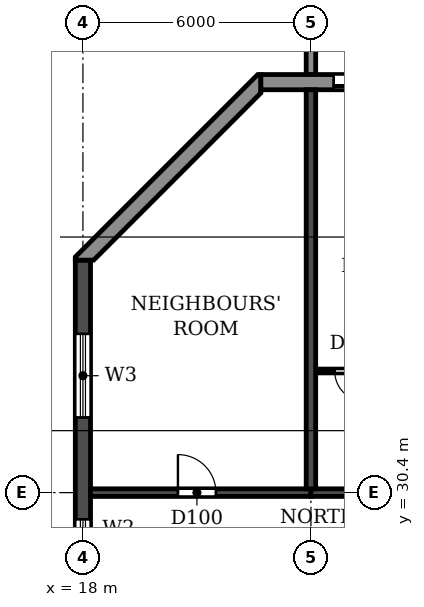
"""IFC4 building model, lengths in metres.
Left out: names, types, materials, properties, quantities, classifications, styles, units other than length and angle.
Written with IfcOpenShell. Run it as: python <this file> out.ifc"""

import sys

from ifc_helpers import new_model, si_unit, direction, frame, frame_2d, origin, place, context, subcontext, project, spatial, polyline, rectangle, outline, extrude, source, transform, mapped, element, fill, save


model = new_model("IFC4")
c1 = context("Model", 3, precision=1e-05, world=origin(), true_north=direction((0.0, 1.0)))
c2 = subcontext(c1, "Body", "Model", "MODEL_VIEW")
j1 = project(units=[si_unit("LENGTHUNIT", "METRE"), si_unit("PLANEANGLEUNIT", "RADIAN")], contexts=[c1])
p1 = place(None, origin())
s1 = spatial("IfcSite", under=j1, at=p1, CompositionType="ELEMENT")
p2 = place(p1, origin())
s2 = spatial("IfcBuilding", under=s1, at=p2, CompositionType="ELEMENT")
p3 = place(p2, frame((0.0, 0.0, 181.8)))
s3 = spatial("IfcBuildingStorey", under=s2, at=p3, CompositionType="ELEMENT", Elevation=181.8)
p4 = place(p3, frame((24.0, 30.5, 0.0), z_axis=(0.0, 0.0, 1.0), x_axis=(0.0, 1.0, 0.0)))
e1 = element("IfcWall", 1, at=p4, inside=s3, PredefinedType="SHEAR", context=c2, shape_type="SweptSolid", body=[
    extrude(rectangle(XDim=10.5, YDim=0.25, at=frame_2d((5.25, 0.0))), origin(), (0.0, 0.0, 1.0), 3.08),
])
p5 = place(p3, frame((18.0, 4.683, 0.0), z_axis=(0.0, 0.0, 1.0), x_axis=(0.0, 1.0, 0.0)))
e2 = element("IfcWall", 2, at=p5, inside=s3, PredefinedType="SHEAR", context=c2, shape_type="SweptSolid", body=[
    extrude(rectangle(XDim=31.834, YDim=0.4, at=frame_2d((15.917, 0.0))), origin(), (0.0, 0.0, 1.0), 3.08),
])
p6 = place(p5, frame((23.817, 0.0, 0.9)))
e3 = element("IfcOpeningElement", 3, at=p6, cuts=e2, PredefinedType="OPENING", context=c2, shape_type="SweptSolid", body=[
    extrude(rectangle(XDim=1.2, YDim=1.5, at=frame_2d((0.6, 0.75))), frame((0.0, 0.21, 0.0), z_axis=(0.0, -1.0, 0.0), x_axis=(1.0, 0.0, 0.0)), (0.0, 0.0, 1.0), 0.42),
])
p7 = place(p5, frame((8.017, 0.0, 0.9)))
e4 = element("IfcOpeningElement", 4, at=p7, cuts=e2, PredefinedType="OPENING", context=c2, shape_type="SweptSolid", body=[
    extrude(rectangle(XDim=1.2, YDim=1.5, at=frame_2d((0.6, 0.75))), frame((0.0, 0.21, 0.0), z_axis=(0.0, -1.0, 0.0), x_axis=(1.0, 0.0, 0.0)), (0.0, 0.0, 1.0), 0.42),
])
p8 = place(p5, frame((27.694, 0.0, 0.6)))
e5 = element("IfcOpeningElement", 5, at=p8, cuts=e2, PredefinedType="OPENING", context=c2, shape_type="SweptSolid", body=[
    extrude(rectangle(XDim=2.2, YDim=1.8, at=frame_2d((1.1, 0.9))), frame((0.0, 0.21, 0.0), z_axis=(0.0, -1.0, 0.0), x_axis=(1.0, 0.0, 0.0)), (0.0, 0.0, 1.0), 0.42),
])
p9 = place(p5, frame((2.541, 0.0, 0.6)))
e6 = element("IfcOpeningElement", 6, at=p9, cuts=e2, PredefinedType="OPENING", context=c2, shape_type="SweptSolid", body=[
    extrude(rectangle(XDim=2.2, YDim=1.8, at=frame_2d((1.1, 0.9))), frame((0.0, 0.21, 0.0), z_axis=(0.0, -1.0, 0.0), x_axis=(1.0, 0.0, 0.0)), (0.0, 0.0, 1.0), 0.42),
])
p10 = place(p5, frame((15.917, 0.0, 0.9)))
e7 = element("IfcOpeningElement", 7, at=p10, cuts=e2, PredefinedType="OPENING", context=c2, shape_type="SweptSolid", body=[
    extrude(rectangle(XDim=1.2, YDim=1.5, at=frame_2d((0.6, 0.75))), frame((0.0, 0.21, 0.0), z_axis=(0.0, -1.0, 0.0), x_axis=(1.0, 0.0, 0.0)), (0.0, 0.0, 1.0), 0.42),
])
p11 = place(p3, frame((18.2, 30.4, 0.0), z_axis=(0.0, 0.0, 1.0), x_axis=(1.0, 0.0, 0.0)))
e8 = element("IfcWall", 8, at=p11, inside=s3, PredefinedType="SHEAR", context=c2, shape_type="SweptSolid", body=[
    extrude(rectangle(XDim=5.8, YDim=0.2, at=frame_2d((2.9, 0.0))), origin(), (0.0, 0.0, 1.0), 2.48),
])
p12 = place(p11, frame((2.3, 0.0, 0.0)))
e9 = element("IfcOpeningElement", 9, at=p12, cuts=e8, PredefinedType="OPENING", context=c2, shape_type="SweptSolid", body=[
    extrude(rectangle(XDim=1.0, YDim=2.1, at=frame_2d((0.5, 1.05))), frame((0.0, 0.11, 0.0), z_axis=(0.0, -1.0, 0.0), x_axis=(1.0, 0.0, 0.0)), (0.0, 0.0, 1.0), 0.22),
])
p13 = place(p3, frame((24.0, 30.4, 0.0), z_axis=(0.0, 0.0, 1.0), x_axis=(1.0, 0.0, 0.0)))
e10 = element("IfcWall", 10, at=p13, inside=s3, PredefinedType="SHEAR", context=c2, shape_type="SweptSolid", body=[
    extrude(rectangle(XDim=6.0, YDim=0.2, at=frame_2d((3.0, 0.0))), origin(), (0.0, 0.0, 1.0), 2.48),
])
p14 = place(p13, frame((2.45, 0.0, 0.0)))
e11 = element("IfcOpeningElement", 11, at=p14, cuts=e10, PredefinedType="OPENING", context=c2, shape_type="SweptSolid", body=[
    extrude(rectangle(XDim=1.0, YDim=2.1, at=frame_2d((0.5, 1.05))), frame((0.0, 0.11, 0.0), z_axis=(0.0, -1.0, 0.0), x_axis=(1.0, 0.0, 0.0)), (0.0, 0.0, 1.0), 0.22),
])
p15 = place(p3, frame((79.317, 41.2, 0.0), z_axis=(0.0, 0.0, 1.0), x_axis=(-1.0, 0.0, 0.0)))
e12 = element("IfcWall", 12, at=p15, inside=s3, PredefinedType="STANDARD", context=c2, shape_type="SweptSolid", body=[
    extrude(rectangle(XDim=56.634, YDim=0.4, at=frame_2d((28.317, 0.0))), origin(), (0.0, 0.0, 1.0), 3.08),
])
p16 = place(p15, frame((52.917, 0.0, 0.0)))
e13 = element("IfcOpeningElement", 13, at=p16, cuts=e12, PredefinedType="OPENING", context=c2, shape_type="SweptSolid", body=[
    extrude(rectangle(XDim=1.8, YDim=2.4, at=frame_2d((0.9, 1.2))), frame((0.0, 0.21, 0.0), z_axis=(0.0, -1.0, 0.0), x_axis=(1.0, 0.0, 0.0)), (0.0, 0.0, 1.0), 0.42),
])
p17 = place(p15, frame((49.717, 0.0, 0.9)))
e14 = element("IfcOpeningElement", 14, at=p17, cuts=e12, PredefinedType="OPENING", context=c2, shape_type="SweptSolid", body=[
    extrude(rectangle(XDim=2.2, YDim=1.5, at=frame_2d((1.1, 0.75))), frame((0.0, 0.21, 0.0), z_axis=(0.0, -1.0, 0.0), x_axis=(1.0, 0.0, 0.0)), (0.0, 0.0, 1.0), 0.42),
])
p18 = place(p15, frame((46.717, 0.0, 0.9)))
e15 = element("IfcOpeningElement", 15, at=p18, cuts=e12, PredefinedType="OPENING", context=c2, shape_type="SweptSolid", body=[
    extrude(rectangle(XDim=2.2, YDim=1.5, at=frame_2d((1.1, 0.75))), frame((0.0, 0.21, 0.0), z_axis=(0.0, -1.0, 0.0), x_axis=(1.0, 0.0, 0.0)), (0.0, 0.0, 1.0), 0.42),
])
p19 = place(p15, frame((43.917, 0.0, 0.0)))
e16 = element("IfcOpeningElement", 16, at=p19, cuts=e12, PredefinedType="OPENING", context=c2, shape_type="SweptSolid", body=[
    extrude(rectangle(XDim=1.8, YDim=2.4, at=frame_2d((0.9, 1.2))), frame((0.0, 0.21, 0.0), z_axis=(0.0, -1.0, 0.0), x_axis=(1.0, 0.0, 0.0)), (0.0, 0.0, 1.0), 0.42),
])
p20 = place(p15, frame((40.717, 0.0, 0.9)))
e17 = element("IfcOpeningElement", 17, at=p20, cuts=e12, PredefinedType="OPENING", context=c2, shape_type="SweptSolid", body=[
    extrude(rectangle(XDim=2.2, YDim=1.5, at=frame_2d((1.1, 0.75))), frame((0.0, 0.21, 0.0), z_axis=(0.0, -1.0, 0.0), x_axis=(1.0, 0.0, 0.0)), (0.0, 0.0, 1.0), 0.42),
])
p21 = place(p15, frame((37.717, 0.0, 0.9)))
e18 = element("IfcOpeningElement", 18, at=p21, cuts=e12, PredefinedType="OPENING", context=c2, shape_type="SweptSolid", body=[
    extrude(rectangle(XDim=2.2, YDim=1.5, at=frame_2d((1.1, 0.75))), frame((0.0, 0.21, 0.0), z_axis=(0.0, -1.0, 0.0), x_axis=(1.0, 0.0, 0.0)), (0.0, 0.0, 1.0), 0.42),
])
p22 = place(p15, frame((34.917, 0.0, 0.0)))
e19 = element("IfcOpeningElement", 19, at=p22, cuts=e12, PredefinedType="OPENING", context=c2, shape_type="SweptSolid", body=[
    extrude(rectangle(XDim=1.8, YDim=2.4, at=frame_2d((0.9, 1.2))), frame((0.0, 0.21, 0.0), z_axis=(0.0, -1.0, 0.0), x_axis=(1.0, 0.0, 0.0)), (0.0, 0.0, 1.0), 0.42),
])
p23 = place(p15, frame((31.717, 0.0, 0.9)))
e20 = element("IfcOpeningElement", 20, at=p23, cuts=e12, PredefinedType="OPENING", context=c2, shape_type="SweptSolid", body=[
    extrude(rectangle(XDim=2.2, YDim=1.5, at=frame_2d((1.1, 0.75))), frame((0.0, 0.21, 0.0), z_axis=(0.0, -1.0, 0.0), x_axis=(1.0, 0.0, 0.0)), (0.0, 0.0, 1.0), 0.42),
])
p24 = place(p15, frame((28.717, 0.0, 0.9)))
e21 = element("IfcOpeningElement", 21, at=p24, cuts=e12, PredefinedType="OPENING", context=c2, shape_type="SweptSolid", body=[
    extrude(rectangle(XDim=2.2, YDim=1.5, at=frame_2d((1.1, 0.75))), frame((0.0, 0.21, 0.0), z_axis=(0.0, -1.0, 0.0), x_axis=(1.0, 0.0, 0.0)), (0.0, 0.0, 1.0), 0.42),
])
p25 = place(p15, frame((25.717, 0.0, 0.9)))
e22 = element("IfcOpeningElement", 22, at=p25, cuts=e12, PredefinedType="OPENING", context=c2, shape_type="SweptSolid", body=[
    extrude(rectangle(XDim=2.2, YDim=1.5, at=frame_2d((1.1, 0.75))), frame((0.0, 0.21, 0.0), z_axis=(0.0, -1.0, 0.0), x_axis=(1.0, 0.0, 0.0)), (0.0, 0.0, 1.0), 0.42),
])
p26 = place(p15, frame((22.917, 0.0, 0.0)))
e23 = element("IfcOpeningElement", 23, at=p26, cuts=e12, PredefinedType="OPENING", context=c2, shape_type="SweptSolid", body=[
    extrude(rectangle(XDim=1.8, YDim=2.4, at=frame_2d((0.9, 1.2))), frame((0.0, 0.21, 0.0), z_axis=(0.0, -1.0, 0.0), x_axis=(1.0, 0.0, 0.0)), (0.0, 0.0, 1.0), 0.42),
])
p27 = place(p15, frame((19.717, 0.0, 0.9)))
e24 = element("IfcOpeningElement", 24, at=p27, cuts=e12, PredefinedType="OPENING", context=c2, shape_type="SweptSolid", body=[
    extrude(rectangle(XDim=2.2, YDim=1.5, at=frame_2d((1.1, 0.75))), frame((0.0, 0.21, 0.0), z_axis=(0.0, -1.0, 0.0), x_axis=(1.0, 0.0, 0.0)), (0.0, 0.0, 1.0), 0.42),
])
p28 = place(p15, frame((16.917, 0.0, 0.0)))
e25 = element("IfcOpeningElement", 25, at=p28, cuts=e12, PredefinedType="OPENING", context=c2, shape_type="SweptSolid", body=[
    extrude(rectangle(XDim=1.8, YDim=2.4, at=frame_2d((0.9, 1.2))), frame((0.0, 0.21, 0.0), z_axis=(0.0, -1.0, 0.0), x_axis=(1.0, 0.0, 0.0)), (0.0, 0.0, 1.0), 0.42),
])
p29 = place(p15, frame((13.717, 0.0, 0.9)))
e26 = element("IfcOpeningElement", 26, at=p29, cuts=e12, PredefinedType="OPENING", context=c2, shape_type="SweptSolid", body=[
    extrude(rectangle(XDim=2.2, YDim=1.5, at=frame_2d((1.1, 0.75))), frame((0.0, 0.21, 0.0), z_axis=(0.0, -1.0, 0.0), x_axis=(1.0, 0.0, 0.0)), (0.0, 0.0, 1.0), 0.42),
])
p30 = place(p15, frame((10.917, 0.0, 0.0)))
e27 = element("IfcOpeningElement", 27, at=p30, cuts=e12, PredefinedType="OPENING", context=c2, shape_type="SweptSolid", body=[
    extrude(rectangle(XDim=1.8, YDim=2.4, at=frame_2d((0.9, 1.2))), frame((0.0, 0.21, 0.0), z_axis=(0.0, -1.0, 0.0), x_axis=(1.0, 0.0, 0.0)), (0.0, 0.0, 1.0), 0.42),
])
p31 = place(p15, frame((7.717, 0.0, 0.9)))
e28 = element("IfcOpeningElement", 28, at=p31, cuts=e12, PredefinedType="OPENING", context=c2, shape_type="SweptSolid", body=[
    extrude(rectangle(XDim=2.2, YDim=1.5, at=frame_2d((1.1, 0.75))), frame((0.0, 0.21, 0.0), z_axis=(0.0, -1.0, 0.0), x_axis=(1.0, 0.0, 0.0)), (0.0, 0.0, 1.0), 0.42),
])
p32 = place(p15, frame((4.717, 0.0, 0.9)))
e29 = element("IfcOpeningElement", 29, at=p32, cuts=e12, PredefinedType="OPENING", context=c2, shape_type="SweptSolid", body=[
    extrude(rectangle(XDim=2.2, YDim=1.5, at=frame_2d((1.1, 0.75))), frame((0.0, 0.21, 0.0), z_axis=(0.0, -1.0, 0.0), x_axis=(1.0, 0.0, 0.0)), (0.0, 0.0, 1.0), 0.42),
])
p33 = place(p15, frame((1.917, 0.0, 0.0)))
e30 = element("IfcOpeningElement", 30, at=p33, cuts=e12, PredefinedType="OPENING", context=c2, shape_type="SweptSolid", body=[
    extrude(rectangle(XDim=1.8, YDim=2.4, at=frame_2d((0.9, 1.2))), frame((0.0, 0.21, 0.0), z_axis=(0.0, -1.0, 0.0), x_axis=(1.0, 0.0, 0.0)), (0.0, 0.0, 1.0), 0.42),
])
p34 = place(p3, origin())
e31 = element("IfcWall", 31, at=p34, inside=s3, PredefinedType="STANDARD", context=c2, shape_type="SweptSolid", body=[
    extrude(outline(polyline([(22.683, 41.4), (22.6, 41.4), (17.8, 36.6), (17.8, 36.517), (18.283, 36.517), (22.683, 40.917), (22.683, 41.4)])), origin(), (0.0, 0.0, 1.0), 3.08),
])
m1 = source(origin(), c2, "Body", "SweptSolid", [
    extrude(outline(polyline([(0.0, 0.0), (0.25, 0.0), (0.25, 3.1), (0.0, 3.1), (0.0, 0.0)])), origin(), (0.0, 0.0, 1.0), 3.1),
])
p35 = place(p3, frame((23.875, 41.4, 0.0)))
e32 = element("IfcWall", 32, at=p35, inside=s3, PredefinedType="STANDARD", context=c2, shape_type="MappedRepresentation", body=[
    mapped(m1, transform((0.0, 0.0, 0.0))),
])
p36 = place(p3, frame((24.135, 33.6, 0.0), z_axis=(0.0, 0.0, 1.0), x_axis=(1.0, 0.0, 0.0)))
e33 = element("IfcWall", 33, at=p36, inside=s3, PredefinedType="PARTITIONING", context=c2, shape_type="SweptSolid", body=[
    extrude(rectangle(XDim=1.965, YDim=0.1, at=frame_2d((0.982, 0.0))), origin(), (0.0, 0.0, 1.0), 3.08),
])
p37 = place(p36, frame((0.49, 0.0, 0.0)))
e34 = element("IfcOpeningElement", 34, at=p37, cuts=e33, PredefinedType="OPENING", context=c2, shape_type="SweptSolid", body=[
    extrude(rectangle(XDim=0.8, YDim=2.1, at=frame_2d((0.4, 1.05))), frame((0.0, 0.06, 0.0), z_axis=(0.0, -1.0, 0.0), x_axis=(1.0, 0.0, 0.0)), (0.0, 0.0, 1.0), 0.12),
])
p38 = place(p16, origin())
e35 = element("IfcDoor", 35, at=p38, inside=s3, OperationType="DOUBLE_DOOR_SLIDING", PredefinedType="DOOR", context=c2, shape_type="SweptSolid", body=[
    extrude(rectangle(XDim=1.8, YDim=2.4, at=frame_2d((0.9, 1.2))), frame((0.0, 0.025, 0.0), z_axis=(0.0, -1.0, 0.0), x_axis=(1.0, 0.0, 0.0)), (0.0, 0.0, 1.0), 0.05),
])
fill(e13, e35)
p39 = place(p6, origin())
e36 = element("IfcWindow", 36, at=p39, inside=s3, PartitioningType="SINGLE_PANEL", PredefinedType="WINDOW", context=c2, shape_type="SweptSolid", body=[
    extrude(rectangle(XDim=1.2, YDim=1.5, at=frame_2d((0.6, 0.75))), frame((0.0, 0.03, 0.0), z_axis=(0.0, -1.0, 0.0), x_axis=(1.0, 0.0, 0.0)), (0.0, 0.0, 1.0), 0.06),
])
fill(e3, e36)
p40 = place(p8, origin())
e37 = element("IfcWindow", 37, at=p40, inside=s3, PartitioningType="DOUBLE_PANEL_HORIZONTAL", PredefinedType="WINDOW", context=c2, shape_type="SweptSolid", body=[
    extrude(rectangle(XDim=2.2, YDim=1.8, at=frame_2d((1.1, 0.9))), frame((0.0, 0.03, 0.0), z_axis=(0.0, -1.0, 0.0), x_axis=(1.0, 0.0, 0.0)), (0.0, 0.0, 1.0), 0.06),
])
fill(e5, e37)
p41 = place(p12, origin())
e38 = element("IfcDoor", 38, at=p41, inside=s3, OperationType="SINGLE_SWING_LEFT", PredefinedType="DOOR", context=c2, shape_type="SweptSolid", body=[
    extrude(rectangle(XDim=1.0, YDim=2.1, at=frame_2d((0.5, 1.05))), frame((0.0, 0.025, 0.0), z_axis=(0.0, -1.0, 0.0), x_axis=(1.0, 0.0, 0.0)), (0.0, 0.0, 1.0), 0.05),
])
fill(e9, e38)
p42 = place(p37, frame((0.8, 0.0, 0.0), z_axis=(0.0, 0.0, 1.0), x_axis=(-1.0, 0.0, 0.0)))
e39 = element("IfcDoor", 39, at=p42, inside=s3, OperationType="SINGLE_SWING_LEFT", PredefinedType="DOOR", context=c2, shape_type="SweptSolid", body=[
    extrude(rectangle(XDim=0.8, YDim=2.1, at=frame_2d((0.4, 1.05))), frame((0.0, 0.025, 0.0), z_axis=(0.0, -1.0, 0.0), x_axis=(1.0, 0.0, 0.0)), (0.0, 0.0, 1.0), 0.05),
])
fill(e34, e39)
save(model, sys.argv[1])
